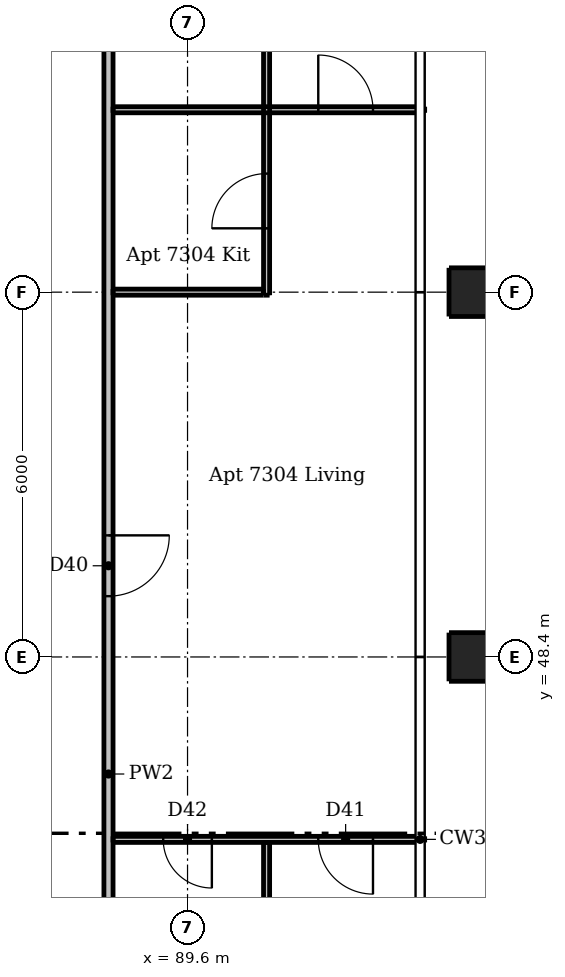
"""IFC4 building model, lengths in metres.
Left out: names, types, materials, properties, quantities, classifications, styles, units other than length and angle.
Written with IfcOpenShell. Run it as: python <this file> out.ifc"""

import sys

from ifc_helpers import new_model, si_unit, direction, frame, frame_2d, origin, origin_2d, place, context, subcontext, project, spatial, rectangle, extrude, element, fill, save


model = new_model("IFC4")
c1 = context("Model", 3, precision=1e-05, world=origin(), true_north=direction((0.0, 1.0)))
c2 = subcontext(c1, "Body", "Model", "MODEL_VIEW")
j1 = project(units=[si_unit("LENGTHUNIT", "METRE"), si_unit("PLANEANGLEUNIT", "RADIAN")], contexts=[c1])
p1 = place(None, origin())
s1 = spatial("IfcSite", under=j1, at=p1, CompositionType="ELEMENT")
p2 = place(p1, origin())
s2 = spatial("IfcBuilding", under=s1, at=p2, CompositionType="ELEMENT")
p3 = place(p2, frame((0.0, 0.0, 271.9)))
s3 = spatial("IfcBuildingStorey", under=s2, at=p3, CompositionType="ELEMENT", Elevation=271.9)
for number, where, z_axis, x_axis in (
    (1, (94.3, 48.4, 0.0), (0.0, 0.0, 1.0), (1.0, 0.0, 0.0)),
    (2, (94.3, 54.4, 0.0), (0.0, 0.0, 1.0), (1.0, 0.0, 0.0)),
):
    element("IfcColumn", number, at=place(p3, frame(where, z_axis=z_axis, x_axis=x_axis)), inside=s3, PredefinedType="COLUMN", context=c2, shape_type="SweptSolid", body=[
        extrude(rectangle(XDim=0.8, YDim=0.8, at=origin_2d()), origin(), (0.0, 0.0, 1.0), 3.05),
    ])
p4 = place(p3, frame((90.9, 41.75, 0.0), z_axis=(0.0, 0.0, 1.0), x_axis=(0.0, 1.0, 0.0)))
e3 = element("IfcWall", 3, at=p4, inside=s3, PredefinedType="PARTITIONING", context=c2, shape_type="SweptSolid", body=[
    extrude(rectangle(XDim=3.6, YDim=0.1, at=frame_2d((1.8, 0.0))), origin(), (0.0, 0.0, 1.0), 3.05),
])
p5 = place(p3, frame((90.9, 54.35, 0.0), z_axis=(0.0, 0.0, 1.0), x_axis=(0.0, 1.0, 0.0)))
e4 = element("IfcWall", 4, at=p5, inside=s3, PredefinedType="PARTITIONING", context=c2, shape_type="SweptSolid", body=[
    extrude(rectangle(XDim=5.975, YDim=0.1, at=frame_2d((2.987, 0.0))), origin(), (0.0, 0.0, 1.0), 3.05),
])
p6 = place(p5, frame((1.1, 0.0, 0.0)))
e5 = element("IfcOpeningElement", 5, at=p6, cuts=e4, PredefinedType="OPENING", context=c2, shape_type="SweptSolid", body=[
    extrude(rectangle(XDim=0.9, YDim=2.1, at=frame_2d((0.45, 1.05))), frame((0.0, 0.06, 0.0), z_axis=(0.0, -1.0, 0.0), x_axis=(1.0, 0.0, 0.0)), (0.0, 0.0, 1.0), 0.12),
])
p7 = place(p5, frame((4.15, 0.0, 0.0)))
e6 = element("IfcOpeningElement", 6, at=p7, cuts=e4, PredefinedType="OPENING", context=c2, shape_type="SweptSolid", body=[
    extrude(rectangle(XDim=0.8, YDim=2.1, at=frame_2d((0.4, 1.05))), frame((0.0, 0.06, 0.0), z_axis=(0.0, -1.0, 0.0), x_axis=(1.0, 0.0, 0.0)), (0.0, 0.0, 1.0), 0.12),
])
p8 = place(p3, frame((88.375, 57.4, 0.0), z_axis=(0.0, 0.0, 1.0), x_axis=(1.0, 0.0, 0.0)))
e7 = element("IfcWall", 7, at=p8, inside=s3, PredefinedType="PARTITIONING", context=c2, shape_type="SweptSolid", body=[
    extrude(rectangle(XDim=5.125, YDim=0.1, at=frame_2d((2.562, 0.0))), origin(), (0.0, 0.0, 1.0), 3.05),
])
p9 = place(p8, frame((3.375, 0.0, 0.0)))
e8 = element("IfcOpeningElement", 8, at=p9, cuts=e7, PredefinedType="OPENING", context=c2, shape_type="SweptSolid", body=[
    extrude(rectangle(XDim=0.9, YDim=2.1, at=frame_2d((0.45, 1.05))), frame((0.0, 0.06, 0.0), z_axis=(0.0, -1.0, 0.0), x_axis=(1.0, 0.0, 0.0)), (0.0, 0.0, 1.0), 0.12),
])
p10 = place(p3, frame((88.375, 54.4, 0.0), z_axis=(0.0, 0.0, 1.0), x_axis=(1.0, 0.0, 0.0)))
e9 = element("IfcWall", 9, at=p10, inside=s3, PredefinedType="PARTITIONING", context=c2, shape_type="SweptSolid", body=[
    extrude(rectangle(XDim=2.475, YDim=0.1, at=frame_2d((1.238, 0.0))), origin(), (0.0, 0.0, 1.0), 2.59),
])
p11 = place(p3, frame((93.5, 45.4, 0.0), z_axis=(0.0, 0.0, 1.0), x_axis=(-1.0, 0.0, 0.0)))
e10 = element("IfcWall", 10, at=p11, inside=s3, PredefinedType="PARTITIONING", context=c2, shape_type="SweptSolid", body=[
    extrude(rectangle(XDim=5.125, YDim=0.1, at=frame_2d((2.562, 0.0))), origin(), (0.0, 0.0, 1.0), 3.05),
])
p12 = place(p11, frame((0.85, 0.0, 0.0)))
e11 = element("IfcOpeningElement", 11, at=p12, cuts=e10, PredefinedType="OPENING", context=c2, shape_type="SweptSolid", body=[
    extrude(rectangle(XDim=0.9, YDim=2.1, at=frame_2d((0.45, 1.05))), frame((0.0, 0.06, 0.0), z_axis=(0.0, -1.0, 0.0), x_axis=(1.0, 0.0, 0.0)), (0.0, 0.0, 1.0), 0.12),
])
p13 = place(p11, frame((3.5, 0.0, 0.0)))
e12 = element("IfcOpeningElement", 12, at=p13, cuts=e10, PredefinedType="OPENING", context=c2, shape_type="SweptSolid", body=[
    extrude(rectangle(XDim=0.8, YDim=2.1, at=frame_2d((0.4, 1.05))), frame((0.0, 0.06, 0.0), z_axis=(0.0, -1.0, 0.0), x_axis=(1.0, 0.0, 0.0)), (0.0, 0.0, 1.0), 0.12),
])
p14 = place(p3, frame((88.3, 61.175, 0.0), z_axis=(0.0, 0.0, 1.0), x_axis=(0.0, -1.0, 0.0)))
e13 = element("IfcWall", 13, at=p14, inside=s3, PredefinedType="PARTITIONING", context=c2, shape_type="SweptSolid", body=[
    extrude(rectangle(XDim=29.4, YDim=0.15, at=frame_2d((14.7, 0.0))), origin(), (0.0, 0.0, 1.0), 3.05),
])
p15 = place(p14, frame((28.113, 0.0, 0.0)))
e14 = element("IfcOpeningElement", 14, at=p15, cuts=e13, PredefinedType="OPENING", context=c2, shape_type="SweptSolid", body=[
    extrude(rectangle(XDim=1.0, YDim=2.1, at=frame_2d((0.5, 1.05))), frame((0.0, 0.085, 0.0), z_axis=(0.0, -1.0, 0.0), x_axis=(1.0, 0.0, 0.0)), (0.0, 0.0, 1.0), 0.17),
])
p16 = place(p14, frame((10.775, 0.0, 0.0)))
e15 = element("IfcOpeningElement", 15, at=p16, cuts=e13, PredefinedType="OPENING", context=c2, shape_type="SweptSolid", body=[
    extrude(rectangle(XDim=1.0, YDim=2.1, at=frame_2d((0.5, 1.05))), frame((0.0, 0.085, 0.0), z_axis=(0.0, -1.0, 0.0), x_axis=(1.0, 0.0, 0.0)), (0.0, 0.0, 1.0), 0.17),
])
p17 = place(p16, origin())
e16 = element("IfcDoor", 16, at=p17, inside=s3, OperationType="SINGLE_SWING_LEFT", PredefinedType="DOOR", context=c2, shape_type="SweptSolid", body=[
    extrude(rectangle(XDim=1.0, YDim=2.1, at=frame_2d((0.5, 1.05))), frame((0.0, 0.025, 0.0), z_axis=(0.0, -1.0, 0.0), x_axis=(1.0, 0.0, 0.0)), (0.0, 0.0, 1.0), 0.05),
])
fill(e15, e16)
p18 = place(p6, origin())
e17 = element("IfcDoor", 17, at=p18, inside=s3, OperationType="SINGLE_SWING_LEFT", PredefinedType="DOOR", context=c2, shape_type="SweptSolid", body=[
    extrude(rectangle(XDim=0.9, YDim=2.1, at=frame_2d((0.45, 1.05))), frame((0.0, 0.025, 0.0), z_axis=(0.0, -1.0, 0.0), x_axis=(1.0, 0.0, 0.0)), (0.0, 0.0, 1.0), 0.05),
])
fill(e5, e17)
p19 = place(p12, origin())
e18 = element("IfcDoor", 18, at=p19, inside=s3, OperationType="SINGLE_SWING_LEFT", PredefinedType="DOOR", context=c2, shape_type="SweptSolid", body=[
    extrude(rectangle(XDim=0.9, YDim=2.1, at=frame_2d((0.45, 1.05))), frame((0.0, 0.025, 0.0), z_axis=(0.0, -1.0, 0.0), x_axis=(1.0, 0.0, 0.0)), (0.0, 0.0, 1.0), 0.05),
])
fill(e11, e18)
p20 = place(p13, origin())
e19 = element("IfcDoor", 19, at=p20, inside=s3, OperationType="SINGLE_SWING_LEFT", PredefinedType="DOOR", context=c2, shape_type="SweptSolid", body=[
    extrude(rectangle(XDim=0.8, YDim=2.1, at=frame_2d((0.4, 1.05))), frame((0.0, 0.025, 0.0), z_axis=(0.0, -1.0, 0.0), x_axis=(1.0, 0.0, 0.0)), (0.0, 0.0, 1.0), 0.05),
])
fill(e12, e19)
p21 = place(p9, origin())
e20 = element("IfcDoor", 20, at=p21, inside=s3, OperationType="SINGLE_SWING_LEFT", PredefinedType="DOOR", context=c2, shape_type="SweptSolid", body=[
    extrude(rectangle(XDim=0.9, YDim=2.1, at=frame_2d((0.45, 1.05))), frame((0.0, 0.025, 0.0), z_axis=(0.0, -1.0, 0.0), x_axis=(1.0, 0.0, 0.0)), (0.0, 0.0, 1.0), 0.05),
])
fill(e8, e20)
save(model, sys.argv[1])
